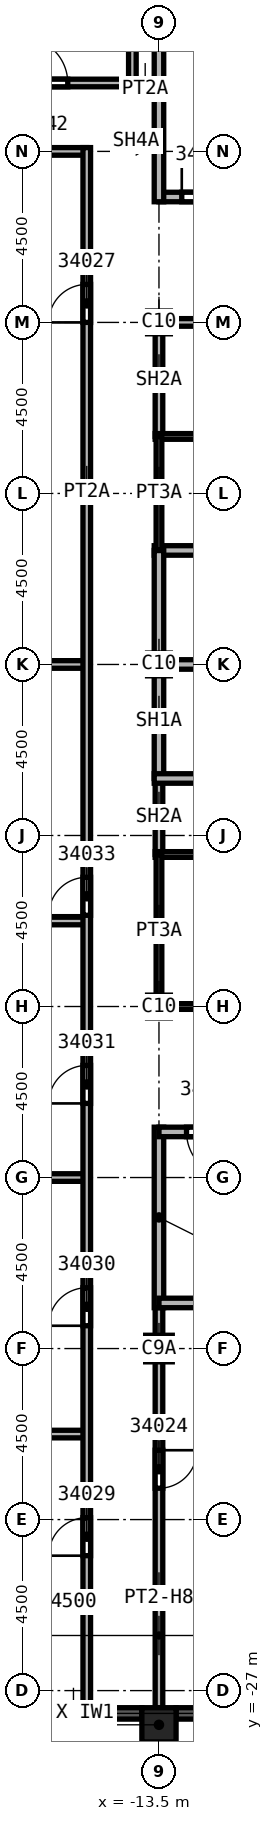
"""IFC4 building model, lengths in metres.
Left out: names, types, materials, properties, quantities, classifications, styles, units other than length and angle.
Written with IfcOpenShell. Run it as: python <this file> out.ifc"""

import sys

from ifc_helpers import new_model, si_unit, direction, frame, frame_2d, origin, origin_2d, place, context, subcontext, project, spatial, rectangle, extrude, element, fill, save


model = new_model("IFC4")
c1 = context("Model", 3, precision=1e-05, world=origin(), true_north=direction((0.0, 1.0)))
c2 = subcontext(c1, "Body", "Model", "MODEL_VIEW")
j1 = project(units=[si_unit("LENGTHUNIT", "METRE"), si_unit("PLANEANGLEUNIT", "RADIAN")], contexts=[c1])
p1 = place(None, origin())
s1 = spatial("IfcSite", under=j1, at=p1, CompositionType="ELEMENT")
p2 = place(p1, origin())
s2 = spatial("IfcBuilding", under=s1, at=p2, CompositionType="ELEMENT")
p3 = place(p2, frame((0.0, 0.0, 366.0)))
s3 = spatial("IfcBuildingStorey", under=s2, at=p3, CompositionType="ELEMENT", Elevation=366.0)
p4 = place(p3, frame((-13.5, -18.0, 0.0), z_axis=(0.0, 0.0, 1.0), x_axis=(1.0, 0.0, 0.0)))
e1 = element("IfcColumn", 1, at=p4, inside=s3, PredefinedType="COLUMN", context=c2, shape_type="SweptSolid", body=[
    extrude(rectangle(XDim=0.7, YDim=0.7, at=origin_2d()), origin(), (0.0, 0.0, 1.0), 9.532),
])
for number, where, z_axis, x_axis in (
    (2, (-13.5, 0.0, 0.0), (0.0, 0.0, 1.0), (1.0, 0.0, 0.0)),
    (3, (-13.5, 9.0, 0.0), (0.0, 0.0, 1.0), (1.0, 0.0, 0.0)),
    (4, (-13.5, -9.0, 0.0), (0.0, 0.0, 1.0), (1.0, 0.0, 0.0)),
):
    element("IfcColumn", number, at=place(p3, frame(where, z_axis=z_axis, x_axis=x_axis)), inside=s3, PredefinedType="COLUMN", context=c2, shape_type="SweptSolid", body=[
        extrude(rectangle(XDim=0.6, YDim=0.6, at=origin_2d()), origin(), (0.0, 0.0, 1.0), 9.6),
    ])
p5 = place(p3, frame((-13.5, -27.9, 0.0), z_axis=(0.0, 0.0, 1.0), x_axis=(1.0, 0.0, 0.0)))
e5 = element("IfcColumn", 5, at=p5, inside=s3, PredefinedType="COLUMN", context=c2, shape_type="SweptSolid", body=[
    extrude(rectangle(XDim=0.9, YDim=0.9, at=origin_2d()), origin(), (0.0, 0.0, 1.0), 4.919),
])
for number, where, z_axis, x_axis in (
    (6, (-17.55, -27.6, 0.0), (0.0, 0.0, 1.0), (1.0, 0.0, 0.0)),
    (7, (-13.05, -27.6, 0.0), (0.0, 0.0, 1.0), (1.0, 0.0, 0.0)),
):
    element("IfcWall", number, at=place(p3, frame(where, z_axis=z_axis, x_axis=x_axis)), inside=s3, PredefinedType="SOLIDWALL", context=c2, shape_type="SweptSolid", body=[
        extrude(rectangle(XDim=3.6, YDim=0.3, at=frame_2d((1.8, 0.0))), origin(), (0.0, 0.0, 1.0), 5.4),
    ])
p6 = place(p3, frame((-26.736, -6.75, 0.0), z_axis=(0.0, 0.0, 1.0), x_axis=(1.0, 0.0, 0.0)))
e8 = element("IfcWall", 8, at=p6, inside=s3, PredefinedType="PARTITIONING", context=c2, shape_type="SweptSolid", body=[
    extrude(rectangle(XDim=11.336, YDim=0.2, at=frame_2d((5.668, 0.0))), origin(), (0.0, 0.0, 1.0), 9.115),
])
p7 = place(p3, frame((-24.486, -20.25, 0.0), z_axis=(0.0, 0.0, 1.0), x_axis=(1.0, 0.0, 0.0)))
e9 = element("IfcWall", 9, at=p7, inside=s3, PredefinedType="PARTITIONING", context=c2, shape_type="SweptSolid", body=[
    extrude(rectangle(XDim=9.086, YDim=0.2, at=frame_2d((4.543, 0.0))), origin(), (0.0, 0.0, 1.0), 5.76),
])
p8 = place(p3, frame((-15.4, 0.0, 0.0), z_axis=(0.0, 0.0, 1.0), x_axis=(-1.0, 0.0, 0.0)))
e10 = element("IfcWall", 10, at=p8, inside=s3, PredefinedType="PARTITIONING", context=c2, shape_type="SweptSolid", body=[
    extrude(rectangle(XDim=11.15, YDim=0.2, at=frame_2d((5.575, 0.0))), origin(), (0.0, 0.0, 1.0), 9.15),
])
p9 = place(p3, frame((-15.4, 13.5, 0.0), z_axis=(0.0, 0.0, 1.0), x_axis=(-1.0, 0.0, 0.0)))
e11 = element("IfcWall", 11, at=p9, inside=s3, PredefinedType="PARTITIONING", context=c2, shape_type="SweptSolid", body=[
    extrude(rectangle(XDim=6.6, YDim=0.2, at=frame_2d((3.3, 0.0))), origin(), (0.0, 0.0, 1.0), 9.15),
])
p10 = place(p3, frame((-20.0, -13.5, 0.0), z_axis=(0.0, 0.0, 1.0), x_axis=(1.0, 0.0, 0.0)))
e12 = element("IfcWall", 12, at=p10, inside=s3, PredefinedType="PARTITIONING", context=c2, shape_type="SweptSolid", body=[
    extrude(rectangle(XDim=4.6, YDim=0.2, at=frame_2d((2.3, 0.0))), origin(), (0.0, 0.0, 1.0), 9.115),
])
p11 = place(p3, frame((-15.4, -27.45, 0.0), z_axis=(0.0, 0.0, 1.0), x_axis=(0.0, 1.0, 0.0)))
e13 = element("IfcWall", 13, at=p11, inside=s3, PredefinedType="PARTITIONING", context=c2, shape_type="SweptSolid", body=[
    extrude(rectangle(XDim=41.05, YDim=0.2, at=frame_2d((20.525, 0.0))), origin(), (0.0, 0.0, 1.0), 5.76),
])
p12 = place(p11, frame((36.45, 0.0, 0.0)))
e14 = element("IfcOpeningElement", 14, at=p12, cuts=e13, PredefinedType="OPENING", context=c2, shape_type="SweptSolid", body=[
    extrude(rectangle(XDim=1.0, YDim=2.1, at=frame_2d((0.5, 1.05))), frame((0.0, 0.1, 0.0), z_axis=(0.0, -1.0, 0.0), x_axis=(1.0, 0.0, 0.0)), (0.0, 0.0, 1.0), 0.2),
])
p13 = place(p11, frame((4.0, 0.0, 0.0)))
e15 = element("IfcOpeningElement", 15, at=p13, cuts=e13, PredefinedType="OPENING", context=c2, shape_type="SweptSolid", body=[
    extrude(rectangle(XDim=1.0, YDim=2.1, at=frame_2d((0.5, 1.05))), frame((0.0, 0.1, 0.0), z_axis=(0.0, -1.0, 0.0), x_axis=(1.0, 0.0, 0.0)), (0.0, 0.0, 1.0), 0.2),
])
p14 = place(p11, frame((10.05, 0.0, 0.0)))
e16 = element("IfcOpeningElement", 16, at=p14, cuts=e13, PredefinedType="OPENING", context=c2, shape_type="SweptSolid", body=[
    extrude(rectangle(XDim=1.0, YDim=2.1, at=frame_2d((0.5, 1.05))), frame((0.0, 0.1, 0.0), z_axis=(0.0, -1.0, 0.0), x_axis=(1.0, 0.0, 0.0)), (0.0, 0.0, 1.0), 0.2),
])
p15 = place(p11, frame((15.9, 0.0, 0.0)))
e17 = element("IfcOpeningElement", 17, at=p15, cuts=e13, PredefinedType="OPENING", context=c2, shape_type="SweptSolid", body=[
    extrude(rectangle(XDim=1.0, YDim=2.1, at=frame_2d((0.5, 1.05))), frame((0.0, 0.1, 0.0), z_axis=(0.0, -1.0, 0.0), x_axis=(1.0, 0.0, 0.0)), (0.0, 0.0, 1.0), 0.2),
])
p16 = place(p11, frame((20.85, 0.0, 0.0)))
e18 = element("IfcOpeningElement", 18, at=p16, cuts=e13, PredefinedType="OPENING", context=c2, shape_type="SweptSolid", body=[
    extrude(rectangle(XDim=1.0, YDim=2.1, at=frame_2d((0.5, 1.05))), frame((0.0, 0.1, 0.0), z_axis=(0.0, -1.0, 0.0), x_axis=(1.0, 0.0, 0.0)), (0.0, 0.0, 1.0), 0.2),
])
p17 = place(p3, frame((-14.1, 15.2, 0.0), z_axis=(0.0, 0.0, 1.0), x_axis=(1.0, 0.0, 0.0)))
e19 = element("IfcWall", 19, at=p17, inside=s3, PredefinedType="PARTITIONING", context=c2, shape_type="SweptSolid", body=[
    extrude(rectangle(XDim=0.725, YDim=0.2, at=frame_2d((0.363, 0.0))), origin(), (0.0, 0.0, 1.0), 5.76),
])
p18 = place(p3, frame((-13.5, -16.675, 0.0), z_axis=(0.0, 0.0, 1.0), x_axis=(0.0, -1.0, 0.0)))
e20 = element("IfcWall", 20, at=p18, inside=s3, PredefinedType="PARTITIONING", context=c2, shape_type="SweptSolid", body=[
    extrude(rectangle(XDim=10.775, YDim=0.2, at=frame_2d((5.387, 0.0))), origin(), (0.0, 0.0, 1.0), 4.916),
])
p19 = place(p18, frame((4.0, 0.0, 0.0)))
e21 = element("IfcOpeningElement", 21, at=p19, cuts=e20, PredefinedType="OPENING", context=c2, shape_type="SweptSolid", body=[
    extrude(rectangle(XDim=1.0, YDim=2.1, at=frame_2d((0.5, 1.05))), frame((0.0, 0.1, 0.0), z_axis=(0.0, -1.0, 0.0), x_axis=(1.0, 0.0, 0.0)), (0.0, 0.0, 1.0), 0.2),
])
p20 = place(p3, frame((-13.5, -5.0, 0.0), z_axis=(0.0, 0.0, 1.0), x_axis=(0.0, 1.0, 0.0)))
e22 = element("IfcWall", 22, at=p20, inside=s3, PredefinedType="SOLIDWALL", context=c2, shape_type="SweptSolid", body=[
    extrude(rectangle(XDim=2.0, YDim=0.2, at=frame_2d((1.0, 0.0))), origin(), (0.0, 0.0, 1.0), 5.76),
])
p21 = place(p3, frame((-13.5, 6.0, 0.0), z_axis=(0.0, 0.0, 1.0), x_axis=(0.0, 1.0, 0.0)))
e23 = element("IfcWall", 23, at=p21, inside=s3, PredefinedType="SOLIDWALL", context=c2, shape_type="SweptSolid", body=[
    extrude(rectangle(XDim=3.1, YDim=0.2, at=frame_2d((1.55, 0.0))), origin(), (0.0, 0.0, 1.0), 5.76),
])
p22 = place(p3, frame((-13.5, 9.0, 0.0), z_axis=(0.0, 0.0, 1.0), x_axis=(1.0, 0.0, 0.0)))
e24 = element("IfcWall", 24, at=p22, inside=s3, PredefinedType="SOLIDWALL", context=c2, shape_type="SweptSolid", body=[
    extrude(rectangle(XDim=3.0, YDim=0.2, at=frame_2d((1.5, 0.0))), origin(), (0.0, 0.0, 1.0), 8.838),
])
p23 = place(p3, frame((-13.625, 0.0, 0.0), z_axis=(0.0, 0.0, 1.0), x_axis=(1.0, 0.0, 0.0)))
e25 = element("IfcWall", 25, at=p23, inside=s3, PredefinedType="SOLIDWALL", context=c2, shape_type="SweptSolid", body=[
    extrude(rectangle(XDim=3.125, YDim=0.25, at=frame_2d((1.562, 0.0))), origin(), (0.0, 0.0, 1.0), 9.15),
])
p24 = place(p3, frame((-13.625, 3.0, 0.0), z_axis=(0.0, 0.0, 1.0), x_axis=(1.0, 0.0, 0.0)))
e26 = element("IfcWall", 26, at=p24, inside=s3, PredefinedType="SOLIDWALL", context=c2, shape_type="SweptSolid", body=[
    extrude(rectangle(XDim=6.125, YDim=0.25, at=frame_2d((3.062, 0.0))), origin(), (0.0, 0.0, 1.0), 9.15),
])
p25 = place(p24, frame((4.75, 0.0, 0.0)))
e27 = element("IfcOpeningElement", 27, at=p25, cuts=e26, PredefinedType="OPENING", context=c2, shape_type="SweptSolid", body=[
    extrude(rectangle(XDim=1.1, YDim=2.1, at=frame_2d((0.55, 1.05))), frame((0.0, 0.125, 0.0), z_axis=(0.0, -1.0, 0.0), x_axis=(1.0, 0.0, 0.0)), (0.0, 0.0, 1.0), 0.25),
])
p26 = place(p3, frame((-13.5, -3.0, 0.0), z_axis=(0.0, 0.0, 1.0), x_axis=(0.0, 1.0, 0.0)))
e28 = element("IfcWall", 28, at=p26, inside=s3, PredefinedType="SOLIDWALL", context=c2, shape_type="SweptSolid", body=[
    extrude(rectangle(XDim=6.0, YDim=0.25, at=frame_2d((3.0, 0.0))), origin(), (0.0, 0.0, 1.0), 5.76),
])
p27 = place(p3, frame((-13.625, -3.0, 0.0), z_axis=(0.0, 0.0, 1.0), x_axis=(1.0, 0.0, 0.0)))
e29 = element("IfcWall", 29, at=p27, inside=s3, PredefinedType="SOLIDWALL", context=c2, shape_type="SweptSolid", body=[
    extrude(rectangle(XDim=6.125, YDim=0.25, at=frame_2d((3.062, 0.0))), origin(), (0.0, 0.0, 1.0), 9.15),
])
p28 = place(p27, frame((4.75, 0.0, 0.0)))
e30 = element("IfcOpeningElement", 30, at=p28, cuts=e29, PredefinedType="OPENING", context=c2, shape_type="SweptSolid", body=[
    extrude(rectangle(XDim=1.1, YDim=2.1, at=frame_2d((0.55, 1.05))), frame((0.0, 0.125, 0.0), z_axis=(0.0, -1.0, 0.0), x_axis=(1.0, 0.0, 0.0)), (0.0, 0.0, 1.0), 0.25),
])
p29 = place(p3, frame((-13.5, -12.175, 0.0), z_axis=(0.0, 0.0, 1.0), x_axis=(0.0, -1.0, 0.0)))
e31 = element("IfcWall", 31, at=p29, inside=s3, PredefinedType="SOLIDWALL", context=c2, shape_type="SweptSolid", body=[
    extrude(rectangle(XDim=4.75, YDim=0.25, at=frame_2d((2.375, 0.0))), origin(), (0.0, 0.0, 1.0), 5.76),
])
p30 = place(p3, frame((-13.5, 12.3, 0.0), z_axis=(0.0, 0.0, 1.0), x_axis=(1.0, 0.0, 0.0)))
e32 = element("IfcWall", 32, at=p30, inside=s3, PredefinedType="SOLIDWALL", context=c2, shape_type="SweptSolid", body=[
    extrude(rectangle(XDim=9.125, YDim=0.25, at=frame_2d((4.562, 0.0))), origin(), (0.0, 0.0, 1.0), 9.15),
])
p31 = place(p30, frame((0.6, 0.0, 0.0)))
e33 = element("IfcOpeningElement", 33, at=p31, cuts=e32, PredefinedType="OPENING", context=c2, shape_type="SweptSolid", body=[
    extrude(rectangle(XDim=1.2, YDim=2.1, at=frame_2d((0.6, 1.05))), frame((0.0, 0.125, 0.0), z_axis=(0.0, -1.0, 0.0), x_axis=(1.0, 0.0, 0.0)), (0.0, 0.0, 1.0), 0.25),
])
p32 = place(p3, frame((-13.5, 12.175, 0.0), z_axis=(0.0, 0.0, 1.0), x_axis=(0.0, 1.0, 0.0)))
e34 = element("IfcWall", 34, at=p32, inside=s3, PredefinedType="SOLIDWALL", context=c2, shape_type="SweptSolid", body=[
    extrude(rectangle(XDim=4.75, YDim=0.25, at=frame_2d((2.375, 0.0))), origin(), (0.0, 0.0, 1.0), 5.76),
])
p33 = place(p3, frame((-4.4, -16.8, 0.0), z_axis=(0.0, 0.0, 1.0), x_axis=(-1.0, 0.0, 0.0)))
e35 = element("IfcWall", 35, at=p33, inside=s3, PredefinedType="SOLIDWALL", context=c2, shape_type="SweptSolid", body=[
    extrude(rectangle(XDim=9.1, YDim=0.25, at=frame_2d((4.55, 0.0))), origin(), (0.0, 0.0, 1.0), 5.76),
])
p34 = place(p3, frame((-4.375, -12.3, 0.0), z_axis=(0.0, 0.0, 1.0), x_axis=(-1.0, 0.0, 0.0)))
e36 = element("IfcWall", 36, at=p34, inside=s3, PredefinedType="SOLIDWALL", context=c2, shape_type="SweptSolid", body=[
    extrude(rectangle(XDim=9.125, YDim=0.25, at=frame_2d((4.562, 0.0))), origin(), (0.0, 0.0, 1.0), 9.15),
])
p35 = place(p34, frame((7.2, 0.0, 0.0)))
e37 = element("IfcOpeningElement", 37, at=p35, cuts=e36, PredefinedType="OPENING", context=c2, shape_type="SweptSolid", body=[
    extrude(rectangle(XDim=1.2, YDim=2.1, at=frame_2d((0.6, 1.05))), frame((0.0, 0.125, 0.0), z_axis=(0.0, -1.0, 0.0), x_axis=(1.0, 0.0, 0.0)), (0.0, 0.0, 1.0), 0.25),
])
for number, where, z_axis, x_axis in (
    (38, (-13.6, -5.0, 0.0), (0.0, 0.0, 1.0), (1.0, 0.0, 0.0)),
    (39, (-13.6, 6.0, 0.0), (0.0, 0.0, 1.0), (1.0, 0.0, 0.0)),
):
    element("IfcWall", number, at=place(p3, frame(where, z_axis=z_axis, x_axis=x_axis)), inside=s3, PredefinedType="PARTITIONING", context=c2, shape_type="SweptSolid", body=[
        extrude(rectangle(XDim=3.1, YDim=0.15, at=frame_2d((1.55, 0.0))), origin(), (0.0, 0.0, 1.0), 9.15),
    ])
p36 = place(p3, frame((-13.5, -9.075, 0.0), z_axis=(0.0, 0.0, 1.0), x_axis=(0.0, 1.0, 0.0)))
e40 = element("IfcWall", 40, at=p36, inside=s3, PredefinedType="PARTITIONING", context=c2, shape_type="SweptSolid", body=[
    extrude(rectangle(XDim=4.075, YDim=0.15, at=frame_2d((2.038, 0.0))), origin(), (0.0, 0.0, 1.0), 5.76),
])
p37 = place(p3, frame((-13.5, 3.0, 0.0), z_axis=(0.0, 0.0, 1.0), x_axis=(0.0, 1.0, 0.0)))
e41 = element("IfcWall", 41, at=p37, inside=s3, PredefinedType="PARTITIONING", context=c2, shape_type="SweptSolid", body=[
    extrude(rectangle(XDim=3.0, YDim=0.15, at=frame_2d((1.5, 0.0))), origin(), (0.0, 0.0, 1.0), 5.76),
])
p38 = place(p3, frame((-10.5, -9.0, 0.0), z_axis=(0.0, 0.0, 1.0), x_axis=(-1.0, 0.0, 0.0)))
e42 = element("IfcWall", 42, at=p38, inside=s3, PredefinedType="PARTITIONING", context=c2, shape_type="SweptSolid", body=[
    extrude(rectangle(XDim=3.0, YDim=0.15, at=frame_2d((1.5, 0.0))), origin(), (0.0, 0.0, 1.0), 8.754),
])
p39 = place(p3, frame((-21.9, 15.3, 0.0), z_axis=(0.0, 0.0, 1.0), x_axis=(1.0, 0.0, 0.0)))
e43 = element("IfcWall", 43, at=p39, inside=s3, PredefinedType="SOLIDWALL", context=c2, shape_type="SweptSolid", body=[
    extrude(rectangle(XDim=8.275, YDim=0.2, at=frame_2d((4.137, 0.0))), origin(), (0.0, 0.0, 1.0), 9.15),
])
p40 = place(p39, frame((4.8, 0.0, 0.0)))
e44 = element("IfcOpeningElement", 44, at=p40, cuts=e43, PredefinedType="OPENING", context=c2, shape_type="SweptSolid", body=[
    extrude(rectangle(XDim=1.2, YDim=2.1, at=frame_2d((0.6, 1.05))), frame((0.0, 0.1, 0.0), z_axis=(0.0, -1.0, 0.0), x_axis=(1.0, 0.0, 0.0)), (0.0, 0.0, 1.0), 0.2),
])
p41 = place(p3, frame((-14.2, 15.4, 0.0), z_axis=(0.0, 0.0, 1.0), x_axis=(0.0, 1.0, 0.0)))
e45 = element("IfcWall", 45, at=p41, inside=s3, PredefinedType="SOLIDWALL", context=c2, shape_type="SweptSolid", body=[
    extrude(rectangle(XDim=5.9, YDim=0.2, at=frame_2d((2.95, 0.0))), origin(), (0.0, 0.0, 1.0), 9.15),
])
p42 = place(p31, origin())
e46 = element("IfcDoor", 46, at=p42, inside=s3, OperationType="SINGLE_SWING_RIGHT", PredefinedType="DOOR", context=c2, shape_type="SweptSolid", body=[
    extrude(rectangle(XDim=1.2, YDim=2.1, at=frame_2d((0.6, 1.05))), frame((0.0, 0.025, 0.0), z_axis=(0.0, -1.0, 0.0), x_axis=(1.0, 0.0, 0.0)), (0.0, 0.0, 1.0), 0.05),
])
fill(e33, e46)
p43 = place(p35, origin())
e47 = element("IfcDoor", 47, at=p43, inside=s3, OperationType="SINGLE_SWING_LEFT", PredefinedType="DOOR", context=c2, shape_type="SweptSolid", body=[
    extrude(rectangle(XDim=1.2, YDim=2.1, at=frame_2d((0.6, 1.05))), frame((0.0, 0.025, 0.0), z_axis=(0.0, -1.0, 0.0), x_axis=(1.0, 0.0, 0.0)), (0.0, 0.0, 1.0), 0.05),
])
fill(e37, e47)
p44 = place(p19, origin())
e48 = element("IfcDoor", 48, at=p44, inside=s3, OperationType="SINGLE_SWING_LEFT", PredefinedType="DOOR", context=c2, shape_type="SweptSolid", body=[
    extrude(rectangle(XDim=1.0, YDim=2.1, at=frame_2d((0.5, 1.05))), frame((0.0, 0.025, 0.0), z_axis=(0.0, -1.0, 0.0), x_axis=(1.0, 0.0, 0.0)), (0.0, 0.0, 1.0), 0.05),
])
fill(e21, e48)
p45 = place(p12, origin())
e49 = element("IfcDoor", 49, at=p45, inside=s3, OperationType="SINGLE_SWING_RIGHT", PredefinedType="DOOR", context=c2, shape_type="SweptSolid", body=[
    extrude(rectangle(XDim=1.0, YDim=2.1, at=frame_2d((0.5, 1.05))), frame((0.0, 0.025, 0.0), z_axis=(0.0, -1.0, 0.0), x_axis=(1.0, 0.0, 0.0)), (0.0, 0.0, 1.0), 0.05),
])
fill(e14, e49)
p46 = place(p13, origin())
e50 = element("IfcDoor", 50, at=p46, inside=s3, OperationType="SINGLE_SWING_RIGHT", PredefinedType="DOOR", context=c2, shape_type="SweptSolid", body=[
    extrude(rectangle(XDim=1.0, YDim=2.1, at=frame_2d((0.5, 1.05))), frame((0.0, 0.025, 0.0), z_axis=(0.0, -1.0, 0.0), x_axis=(1.0, 0.0, 0.0)), (0.0, 0.0, 1.0), 0.05),
])
fill(e15, e50)
p47 = place(p14, origin())
e51 = element("IfcDoor", 51, at=p47, inside=s3, OperationType="SINGLE_SWING_LEFT", PredefinedType="DOOR", context=c2, shape_type="SweptSolid", body=[
    extrude(rectangle(XDim=1.0, YDim=2.1, at=frame_2d((0.5, 1.05))), frame((0.0, 0.025, 0.0), z_axis=(0.0, -1.0, 0.0), x_axis=(1.0, 0.0, 0.0)), (0.0, 0.0, 1.0), 0.05),
])
fill(e16, e51)
p48 = place(p15, origin())
e52 = element("IfcDoor", 52, at=p48, inside=s3, OperationType="SINGLE_SWING_RIGHT", PredefinedType="DOOR", context=c2, shape_type="SweptSolid", body=[
    extrude(rectangle(XDim=1.0, YDim=2.1, at=frame_2d((0.5, 1.05))), frame((0.0, 0.025, 0.0), z_axis=(0.0, -1.0, 0.0), x_axis=(1.0, 0.0, 0.0)), (0.0, 0.0, 1.0), 0.05),
])
fill(e17, e52)
p49 = place(p16, origin())
e53 = element("IfcDoor", 53, at=p49, inside=s3, OperationType="SINGLE_SWING_RIGHT", PredefinedType="DOOR", context=c2, shape_type="SweptSolid", body=[
    extrude(rectangle(XDim=1.0, YDim=2.1, at=frame_2d((0.5, 1.05))), frame((0.0, 0.025, 0.0), z_axis=(0.0, -1.0, 0.0), x_axis=(1.0, 0.0, 0.0)), (0.0, 0.0, 1.0), 0.05),
])
fill(e18, e53)
p50 = place(p40, origin())
e54 = element("IfcDoor", 54, at=p50, inside=s3, OperationType="SINGLE_SWING_RIGHT", PredefinedType="DOOR", context=c2, shape_type="SweptSolid", body=[
    extrude(rectangle(XDim=1.2, YDim=2.1, at=frame_2d((0.6, 1.05))), frame((0.0, 0.025, 0.0), z_axis=(0.0, -1.0, 0.0), x_axis=(1.0, 0.0, 0.0)), (0.0, 0.0, 1.0), 0.05),
])
fill(e44, e54)
save(model, sys.argv[1])
